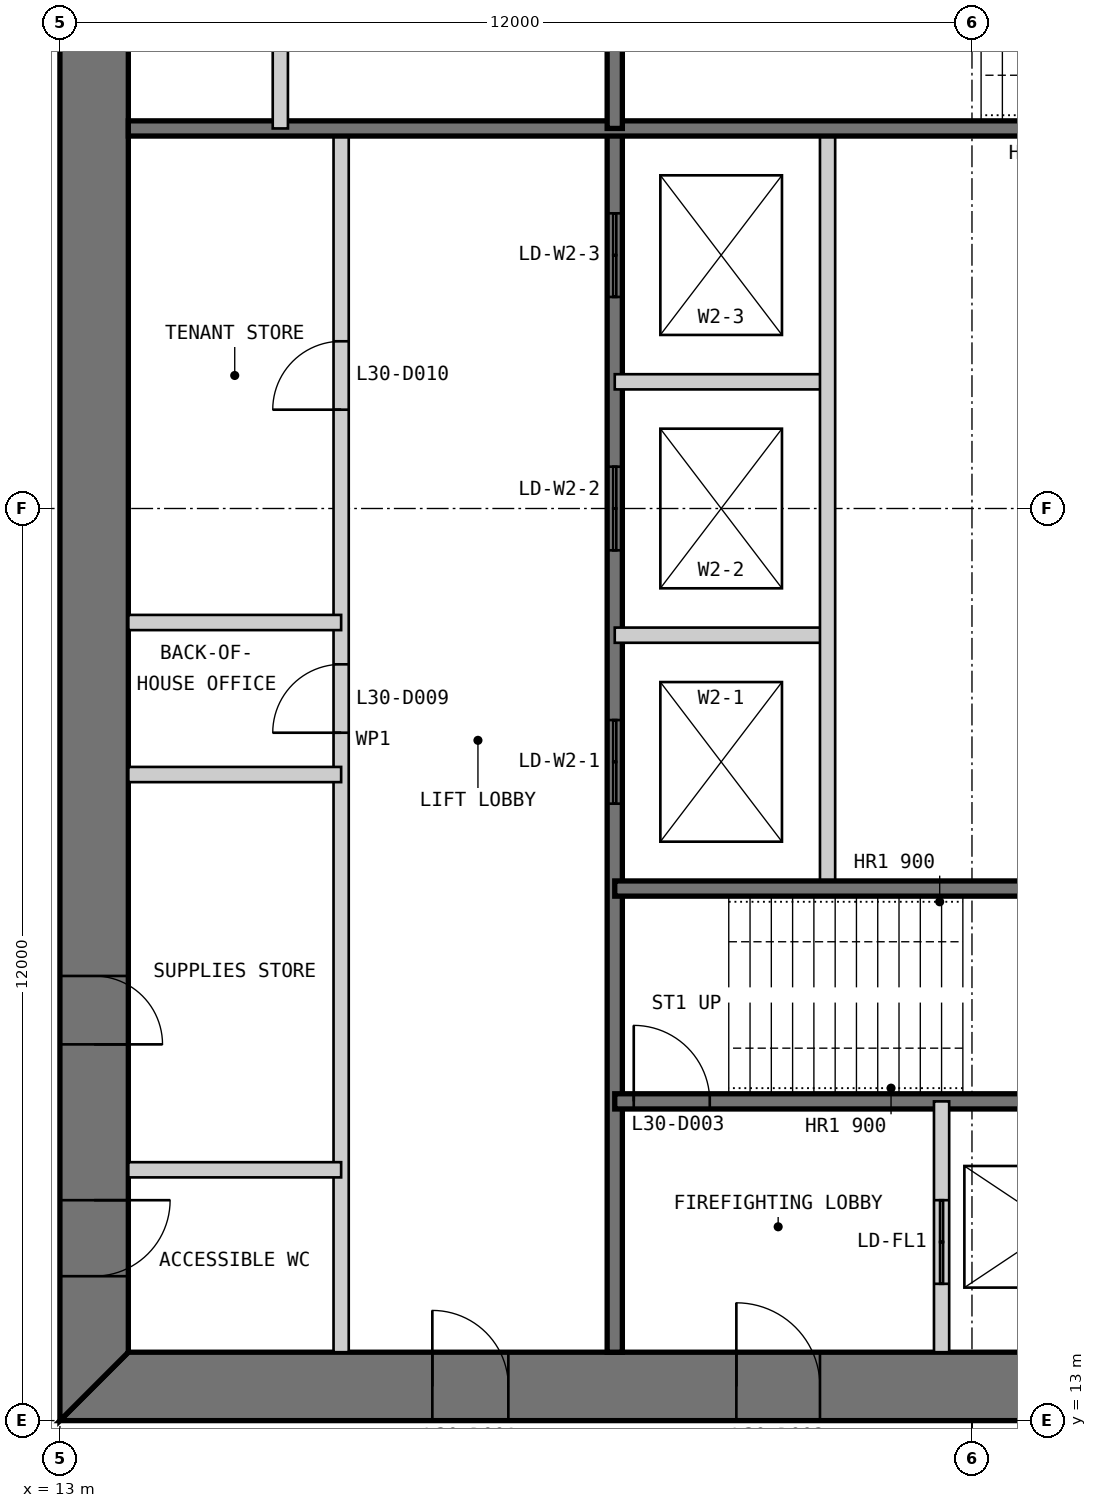
"""IFC4 building model, lengths in metres.
Left out: names, types, materials, properties, quantities, classifications, styles, units other than length and angle.
Written with IfcOpenShell. Run it as: python <this file> out.ifc"""

import sys

from ifc_helpers import new_model, si_unit, direction, frame, frame_2d, origin, place, context, subcontext, project, spatial, polyline, rectangle, outline, extrude, element, fill, save


model = new_model("IFC4")
c1 = context("Model", 3, precision=1e-05, world=origin(), true_north=direction((0.0, 1.0)))
c2 = subcontext(c1, "Body", "Model", "MODEL_VIEW")
j1 = project(units=[si_unit("LENGTHUNIT", "METRE"), si_unit("PLANEANGLEUNIT", "RADIAN")], contexts=[c1])
p1 = place(None, origin())
s1 = spatial("IfcSite", under=j1, at=p1, CompositionType="ELEMENT")
p2 = place(p1, origin())
s2 = spatial("IfcBuilding", under=s1, at=p2, CompositionType="ELEMENT")
p3 = place(p2, frame((0.0, 0.0, 130.4)))
s3 = spatial("IfcBuildingStorey", under=s2, at=p3, CompositionType="ELEMENT", Elevation=130.4)
p4 = place(p3, frame((13.0, 13.45, 0.0), z_axis=(0.0, 0.0, 1.0), x_axis=(1.0, 0.0, 0.0)))
e1 = element("IfcWall", 1, at=p4, inside=s3, PredefinedType="SHEAR", context=c2, shape_type="SweptSolid", body=[
    extrude(outline(polyline([(0.0, -0.45), (24.0, -0.45), (23.1, 0.45), (0.9, 0.45), (0.0, -0.45)])), origin(), (0.0, 0.0, 1.0), 4.0),
])
p5 = place(p4, frame((4.9, 0.0, 0.0)))
e2 = element("IfcOpeningElement", 2, at=p5, cuts=e1, PredefinedType="OPENING", context=c2, shape_type="SweptSolid", body=[
    extrude(rectangle(XDim=1.0, YDim=2.2, at=frame_2d((0.5, 1.1))), frame((0.0, 0.46, 0.0), z_axis=(0.0, -1.0, 0.0), x_axis=(1.0, 0.0, 0.0)), (0.0, 0.0, 1.0), 0.92),
])
p6 = place(p4, frame((8.9, 0.0, 0.0)))
e3 = element("IfcOpeningElement", 3, at=p6, cuts=e1, PredefinedType="OPENING", context=c2, shape_type="SweptSolid", body=[
    extrude(rectangle(XDim=1.1, YDim=2.2, at=frame_2d((0.55, 1.1))), frame((0.0, 0.46, 0.0), z_axis=(0.0, -1.0, 0.0), x_axis=(1.0, 0.0, 0.0)), (0.0, 0.0, 1.0), 0.92),
])
p7 = place(p4, frame((15.05, 0.0, 0.0)))
e4 = element("IfcOpeningElement", 4, at=p7, cuts=e1, PredefinedType="OPENING", context=c2, shape_type="SweptSolid", body=[
    extrude(rectangle(XDim=0.9, YDim=2.2, at=frame_2d((0.45, 1.1))), frame((0.0, 0.46, 0.0), z_axis=(0.0, -1.0, 0.0), x_axis=(1.0, 0.0, 0.0)), (0.0, 0.0, 1.0), 0.92),
])
p8 = place(p4, frame((17.9, 0.0, 0.0)))
e5 = element("IfcOpeningElement", 5, at=p8, cuts=e1, PredefinedType="OPENING", context=c2, shape_type="SweptSolid", body=[
    extrude(rectangle(XDim=1.0, YDim=2.2, at=frame_2d((0.5, 1.1))), frame((0.0, 0.46, 0.0), z_axis=(0.0, -1.0, 0.0), x_axis=(1.0, 0.0, 0.0)), (0.0, 0.0, 1.0), 0.92),
])
p9 = place(p4, frame((21.4, 0.0, 0.0)))
e6 = element("IfcOpeningElement", 6, at=p9, cuts=e1, PredefinedType="OPENING", context=c2, shape_type="SweptSolid", body=[
    extrude(rectangle(XDim=1.0, YDim=2.2, at=frame_2d((0.5, 1.1))), frame((0.0, 0.46, 0.0), z_axis=(0.0, -1.0, 0.0), x_axis=(1.0, 0.0, 0.0)), (0.0, 0.0, 1.0), 0.92),
])
p10 = place(p3, frame((13.45, 36.1, 0.0), z_axis=(0.0, 0.0, 1.0), x_axis=(0.0, -1.0, 0.0)))
e7 = element("IfcWall", 7, at=p10, inside=s3, PredefinedType="SHEAR", context=c2, shape_type="SweptSolid", body=[
    extrude(outline(polyline([(-0.9, -0.45), (23.1, -0.45), (22.2, 0.45), (0.0, 0.45), (-0.9, -0.45)])), origin(), (0.0, 0.0, 1.0), 4.0),
])
p11 = place(p10, frame((20.2, 0.0, 0.0)))
e8 = element("IfcOpeningElement", 8, at=p11, cuts=e7, PredefinedType="OPENING", context=c2, shape_type="SweptSolid", body=[
    extrude(rectangle(XDim=1.0, YDim=2.2, at=frame_2d((0.5, 1.1))), frame((0.0, 0.46, 0.0), z_axis=(0.0, -1.0, 0.0), x_axis=(1.0, 0.0, 0.0)), (0.0, 0.0, 1.0), 0.92),
])
p12 = place(p10, frame((17.25, 0.0, 0.0)))
e9 = element("IfcOpeningElement", 9, at=p12, cuts=e7, PredefinedType="OPENING", context=c2, shape_type="SweptSolid", body=[
    extrude(rectangle(XDim=0.9, YDim=2.2, at=frame_2d((0.45, 1.1))), frame((0.0, 0.46, 0.0), z_axis=(0.0, -1.0, 0.0), x_axis=(1.0, 0.0, 0.0)), (0.0, 0.0, 1.0), 0.92),
])
p13 = place(p3, frame((16.7, 13.9, 0.0), z_axis=(0.0, 0.0, 1.0), x_axis=(0.0, 1.0, 0.0)))
e10 = element("IfcWall", 10, at=p13, inside=s3, PredefinedType="PARTITIONING", context=c2, shape_type="SweptSolid", body=[
    extrude(rectangle(XDim=16.1, YDim=0.2, at=frame_2d((8.05, 0.0))), origin(), (0.0, 0.0, 1.0), 3.8),
])
p14 = place(p13, frame((8.15, 0.0, 0.0)))
e11 = element("IfcOpeningElement", 11, at=p14, cuts=e10, PredefinedType="OPENING", context=c2, shape_type="SweptSolid", body=[
    extrude(rectangle(XDim=0.9, YDim=2.2, at=frame_2d((0.45, 1.1))), frame((0.0, 0.11, 0.0), z_axis=(0.0, -1.0, 0.0), x_axis=(1.0, 0.0, 0.0)), (0.0, 0.0, 1.0), 0.22),
])
p15 = place(p13, frame((12.4, 0.0, 0.0)))
e12 = element("IfcOpeningElement", 12, at=p15, cuts=e10, PredefinedType="OPENING", context=c2, shape_type="SweptSolid", body=[
    extrude(rectangle(XDim=0.9, YDim=2.2, at=frame_2d((0.45, 1.1))), frame((0.0, 0.11, 0.0), z_axis=(0.0, -1.0, 0.0), x_axis=(1.0, 0.0, 0.0)), (0.0, 0.0, 1.0), 0.22),
])
p16 = place(p3, frame((20.3, 13.9, 0.0), z_axis=(0.0, 0.0, 1.0), x_axis=(0.0, 1.0, 0.0)))
e13 = element("IfcWall", 13, at=p16, inside=s3, PredefinedType="SOLIDWALL", context=c2, shape_type="SweptSolid", body=[
    extrude(rectangle(XDim=16.1, YDim=0.2, at=frame_2d((8.05, 0.0))), origin(), (0.0, 0.0, 1.0), 3.8),
])
p17 = place(p16, frame((7.217, 0.0, 0.0)))
e14 = element("IfcOpeningElement", 14, at=p17, cuts=e13, PredefinedType="OPENING", context=c2, shape_type="SweptSolid", body=[
    extrude(rectangle(XDim=1.1, YDim=2.2, at=frame_2d((0.55, 1.1))), frame((0.0, 0.11, 0.0), z_axis=(0.0, -1.0, 0.0), x_axis=(1.0, 0.0, 0.0)), (0.0, 0.0, 1.0), 0.22),
])
p18 = place(p16, frame((10.55, 0.0, 0.0)))
e15 = element("IfcOpeningElement", 15, at=p18, cuts=e13, PredefinedType="OPENING", context=c2, shape_type="SweptSolid", body=[
    extrude(rectangle(XDim=1.1, YDim=2.2, at=frame_2d((0.55, 1.1))), frame((0.0, 0.11, 0.0), z_axis=(0.0, -1.0, 0.0), x_axis=(1.0, 0.0, 0.0)), (0.0, 0.0, 1.0), 0.22),
])
p19 = place(p16, frame((13.883, 0.0, 0.0)))
e16 = element("IfcOpeningElement", 16, at=p19, cuts=e13, PredefinedType="OPENING", context=c2, shape_type="SweptSolid", body=[
    extrude(rectangle(XDim=1.1, YDim=2.2, at=frame_2d((0.55, 1.1))), frame((0.0, 0.11, 0.0), z_axis=(0.0, -1.0, 0.0), x_axis=(1.0, 0.0, 0.0)), (0.0, 0.0, 1.0), 0.22),
])
for number, where, z_axis, x_axis in (
    (17, (20.3, 23.333, 0.0), (0.0, 0.0, 1.0), (1.0, 0.0, 0.0)),
    (18, (20.3, 26.667, 0.0), (0.0, 0.0, 1.0), (1.0, 0.0, 0.0)),
):
    element("IfcWall", number, at=place(p3, frame(where, z_axis=z_axis, x_axis=x_axis)), inside=s3, PredefinedType="PARTITIONING", context=c2, shape_type="SweptSolid", body=[
        extrude(rectangle(XDim=2.8, YDim=0.2, at=frame_2d((1.4, 0.0))), origin(), (0.0, 0.0, 1.0), 3.8),
    ])
p20 = place(p3, frame((23.1, 20.0, 0.0), z_axis=(0.0, 0.0, 1.0), x_axis=(0.0, 1.0, 0.0)))
e19 = element("IfcWall", 19, at=p20, inside=s3, PredefinedType="PARTITIONING", context=c2, shape_type="SweptSolid", body=[
    extrude(rectangle(XDim=10.0, YDim=0.2, at=frame_2d((5.0, 0.0))), origin(), (0.0, 0.0, 1.0), 3.8),
])
p21 = place(p3, frame((20.3, 17.2, 0.0), z_axis=(0.0, 0.0, 1.0), x_axis=(1.0, 0.0, 0.0)))
e20 = element("IfcWall", 20, at=p21, inside=s3, PredefinedType="SOLIDWALL", context=c2, shape_type="SweptSolid", body=[
    extrude(rectangle(XDim=9.4, YDim=0.2, at=frame_2d((4.7, 0.0))), origin(), (0.0, 0.0, 1.0), 3.8),
])
p22 = place(p21, frame((0.25, 0.0, 0.0)))
e21 = element("IfcOpeningElement", 21, at=p22, cuts=e20, PredefinedType="OPENING", context=c2, shape_type="SweptSolid", body=[
    extrude(rectangle(XDim=1.0, YDim=2.2, at=frame_2d((0.5, 1.1))), frame((0.0, 0.11, 0.0), z_axis=(0.0, -1.0, 0.0), x_axis=(1.0, 0.0, 0.0)), (0.0, 0.0, 1.0), 0.22),
])
p23 = place(p3, frame((20.3, 20.0, 0.0), z_axis=(0.0, 0.0, 1.0), x_axis=(1.0, 0.0, 0.0)))
e22 = element("IfcWall", 22, at=p23, inside=s3, PredefinedType="SOLIDWALL", context=c2, shape_type="SweptSolid", body=[
    extrude(rectangle(XDim=15.8, YDim=0.2, at=frame_2d((7.9, 0.0))), origin(), (0.0, 0.0, 1.0), 3.8),
])
p24 = place(p3, frame((24.6, 13.9, 0.0), z_axis=(0.0, 0.0, 1.0), x_axis=(0.0, 1.0, 0.0)))
e23 = element("IfcWall", 23, at=p24, inside=s3, PredefinedType="PARTITIONING", context=c2, shape_type="SweptSolid", body=[
    extrude(rectangle(XDim=3.3, YDim=0.2, at=frame_2d((1.65, 0.0))), origin(), (0.0, 0.0, 1.0), 3.8),
])
p25 = place(p24, frame((0.9, 0.0, 0.0)))
e24 = element("IfcOpeningElement", 24, at=p25, cuts=e23, PredefinedType="OPENING", context=c2, shape_type="SweptSolid", body=[
    extrude(rectangle(XDim=1.1, YDim=2.2, at=frame_2d((0.55, 1.1))), frame((0.0, 0.11, 0.0), z_axis=(0.0, -1.0, 0.0), x_axis=(1.0, 0.0, 0.0)), (0.0, 0.0, 1.0), 0.22),
])
for number, where, z_axis, x_axis in (
    (25, (13.9, 16.3, 0.0), (0.0, 0.0, 1.0), (1.0, 0.0, 0.0)),
    (26, (13.9, 21.5, 0.0), (0.0, 0.0, 1.0), (1.0, 0.0, 0.0)),
    (27, (13.9, 23.5, 0.0), (0.0, 0.0, 1.0), (1.0, 0.0, 0.0)),
):
    element("IfcWall", number, at=place(p3, frame(where, z_axis=z_axis, x_axis=x_axis)), inside=s3, PredefinedType="PARTITIONING", context=c2, shape_type="SweptSolid", body=[
        extrude(rectangle(XDim=2.8, YDim=0.2, at=frame_2d((1.4, 0.0))), origin(), (0.0, 0.0, 1.0), 3.8),
    ])
p26 = place(p3, frame((29.7, 30.0, 0.0), z_axis=(0.0, 0.0, 1.0), x_axis=(-1.0, 0.0, 0.0)))
e28 = element("IfcWall", 28, at=p26, inside=s3, PredefinedType="SOLIDWALL", context=c2, shape_type="SweptSolid", body=[
    extrude(rectangle(XDim=15.8, YDim=0.2, at=frame_2d((7.9, 0.0))), origin(), (0.0, 0.0, 1.0), 3.8),
])
p27 = place(p3, frame((20.3, 36.1, 0.0), z_axis=(0.0, 0.0, 1.0), x_axis=(0.0, -1.0, 0.0)))
e29 = element("IfcWall", 29, at=p27, inside=s3, PredefinedType="SOLIDWALL", context=c2, shape_type="SweptSolid", body=[
    extrude(rectangle(XDim=6.1, YDim=0.2, at=frame_2d((3.05, 0.0))), origin(), (0.0, 0.0, 1.0), 3.8),
])
p28 = place(p3, frame((15.9, 36.1, 0.0), z_axis=(0.0, 0.0, 1.0), x_axis=(0.0, -1.0, 0.0)))
e30 = element("IfcWall", 30, at=p28, inside=s3, PredefinedType="PARTITIONING", context=c2, shape_type="SweptSolid", body=[
    extrude(rectangle(XDim=6.1, YDim=0.2, at=frame_2d((3.05, 0.0))), origin(), (0.0, 0.0, 1.0), 3.8),
])
p29 = place(p5, origin())
e31 = element("IfcDoor", 31, at=p29, inside=s3, OperationType="SINGLE_SWING_LEFT", PredefinedType="DOOR", context=c2, shape_type="SweptSolid", body=[
    extrude(rectangle(XDim=1.0, YDim=2.2, at=frame_2d((0.5, 1.1))), frame((0.0, 0.025, 0.0), z_axis=(0.0, -1.0, 0.0), x_axis=(1.0, 0.0, 0.0)), (0.0, 0.0, 1.0), 0.05),
    extrude(outline(polyline([(0.0, 0.0), (0.04, 0.0), (0.04, 2.16), (0.96, 2.16), (0.96, 0.0), (1.0, 0.0), (1.0, 2.2), (0.0, 2.2), (0.0, 0.0)])), frame((0.0, 0.3, 0.0), z_axis=(0.0, -1.0, 0.0), x_axis=(1.0, 0.0, 0.0)), (0.0, 0.0, 1.0), 0.6),
])
fill(e2, e31)
p30 = place(p6, origin())
e32 = element("IfcDoor", 32, at=p30, inside=s3, OperationType="SINGLE_SWING_LEFT", PredefinedType="DOOR", context=c2, shape_type="SweptSolid", body=[
    extrude(rectangle(XDim=1.1, YDim=2.2, at=frame_2d((0.55, 1.1))), frame((0.0, 0.025, 0.0), z_axis=(0.0, -1.0, 0.0), x_axis=(1.0, 0.0, 0.0)), (0.0, 0.0, 1.0), 0.05),
    extrude(outline(polyline([(0.0, 0.0), (0.04, 0.0), (0.04, 2.16), (1.06, 2.16), (1.06, 0.0), (1.1, 0.0), (1.1, 2.2), (0.0, 2.2), (0.0, 0.0)])), frame((0.0, 0.3, 0.0), z_axis=(0.0, -1.0, 0.0), x_axis=(1.0, 0.0, 0.0)), (0.0, 0.0, 1.0), 0.6),
])
fill(e3, e32)
p31 = place(p22, origin())
e33 = element("IfcDoor", 33, at=p31, inside=s3, OperationType="SINGLE_SWING_LEFT", PredefinedType="DOOR", context=c2, shape_type="SweptSolid", body=[
    extrude(rectangle(XDim=1.0, YDim=2.2, at=frame_2d((0.5, 1.1))), frame((0.0, 0.025, 0.0), z_axis=(0.0, -1.0, 0.0), x_axis=(1.0, 0.0, 0.0)), (0.0, 0.0, 1.0), 0.05),
])
fill(e21, e33)
p32 = place(p11, origin())
e34 = element("IfcDoor", 34, at=p32, inside=s3, OperationType="SINGLE_SWING_LEFT", PredefinedType="DOOR", context=c2, shape_type="SweptSolid", body=[
    extrude(rectangle(XDim=1.0, YDim=2.2, at=frame_2d((0.5, 1.1))), frame((0.0, 0.025, 0.0), z_axis=(0.0, -1.0, 0.0), x_axis=(1.0, 0.0, 0.0)), (0.0, 0.0, 1.0), 0.05),
    extrude(outline(polyline([(0.0, 0.0), (0.04, 0.0), (0.04, 2.16), (0.96, 2.16), (0.96, 0.0), (1.0, 0.0), (1.0, 2.2), (0.0, 2.2), (0.0, 0.0)])), frame((0.0, 0.3, 0.0), z_axis=(0.0, -1.0, 0.0), x_axis=(1.0, 0.0, 0.0)), (0.0, 0.0, 1.0), 0.6),
])
fill(e8, e34)
p33 = place(p12, origin())
e35 = element("IfcDoor", 35, at=p33, inside=s3, OperationType="SINGLE_SWING_RIGHT", PredefinedType="DOOR", context=c2, shape_type="SweptSolid", body=[
    extrude(rectangle(XDim=0.9, YDim=2.2, at=frame_2d((0.45, 1.1))), frame((0.0, 0.025, 0.0), z_axis=(0.0, -1.0, 0.0), x_axis=(1.0, 0.0, 0.0)), (0.0, 0.0, 1.0), 0.05),
    extrude(outline(polyline([(0.0, 0.0), (0.04, 0.0), (0.04, 2.16), (0.86, 2.16), (0.86, 0.0), (0.9, 0.0), (0.9, 2.2), (0.0, 2.2), (0.0, 0.0)])), frame((0.0, 0.3, 0.0), z_axis=(0.0, -1.0, 0.0), x_axis=(1.0, 0.0, 0.0)), (0.0, 0.0, 1.0), 0.6),
])
fill(e9, e35)
p34 = place(p14, origin())
e36 = element("IfcDoor", 36, at=p34, inside=s3, OperationType="SINGLE_SWING_LEFT", PredefinedType="DOOR", context=c2, shape_type="SweptSolid", body=[
    extrude(rectangle(XDim=0.9, YDim=2.2, at=frame_2d((0.45, 1.1))), frame((0.0, 0.025, 0.0), z_axis=(0.0, -1.0, 0.0), x_axis=(1.0, 0.0, 0.0)), (0.0, 0.0, 1.0), 0.05),
])
fill(e11, e36)
p35 = place(p15, origin())
e37 = element("IfcDoor", 37, at=p35, inside=s3, OperationType="SINGLE_SWING_LEFT", PredefinedType="DOOR", context=c2, shape_type="SweptSolid", body=[
    extrude(rectangle(XDim=0.9, YDim=2.2, at=frame_2d((0.45, 1.1))), frame((0.0, 0.025, 0.0), z_axis=(0.0, -1.0, 0.0), x_axis=(1.0, 0.0, 0.0)), (0.0, 0.0, 1.0), 0.05),
])
fill(e12, e37)
p36 = place(p25, origin())
e38 = element("IfcDoor", 38, at=p36, inside=s3, OperationType="DOUBLE_DOOR_SLIDING", PredefinedType="DOOR", context=c2, shape_type="SweptSolid", body=[
    extrude(rectangle(XDim=1.1, YDim=2.2, at=frame_2d((0.55, 1.1))), frame((0.0, 0.025, 0.0), z_axis=(0.0, -1.0, 0.0), x_axis=(1.0, 0.0, 0.0)), (0.0, 0.0, 1.0), 0.05),
])
fill(e24, e38)
p37 = place(p17, origin())
e39 = element("IfcDoor", 39, at=p37, inside=s3, OperationType="DOUBLE_DOOR_SLIDING", PredefinedType="DOOR", context=c2, shape_type="SweptSolid", body=[
    extrude(rectangle(XDim=1.1, YDim=2.2, at=frame_2d((0.55, 1.1))), frame((0.0, 0.025, 0.0), z_axis=(0.0, -1.0, 0.0), x_axis=(1.0, 0.0, 0.0)), (0.0, 0.0, 1.0), 0.05),
])
fill(e14, e39)
p38 = place(p18, origin())
e40 = element("IfcDoor", 40, at=p38, inside=s3, OperationType="DOUBLE_DOOR_SLIDING", PredefinedType="DOOR", context=c2, shape_type="SweptSolid", body=[
    extrude(rectangle(XDim=1.1, YDim=2.2, at=frame_2d((0.55, 1.1))), frame((0.0, 0.025, 0.0), z_axis=(0.0, -1.0, 0.0), x_axis=(1.0, 0.0, 0.0)), (0.0, 0.0, 1.0), 0.05),
])
fill(e15, e40)
p39 = place(p19, origin())
e41 = element("IfcDoor", 41, at=p39, inside=s3, OperationType="DOUBLE_DOOR_SLIDING", PredefinedType="DOOR", context=c2, shape_type="SweptSolid", body=[
    extrude(rectangle(XDim=1.1, YDim=2.2, at=frame_2d((0.55, 1.1))), frame((0.0, 0.025, 0.0), z_axis=(0.0, -1.0, 0.0), x_axis=(1.0, 0.0, 0.0)), (0.0, 0.0, 1.0), 0.05),
])
fill(e16, e41)
save(model, sys.argv[1])
